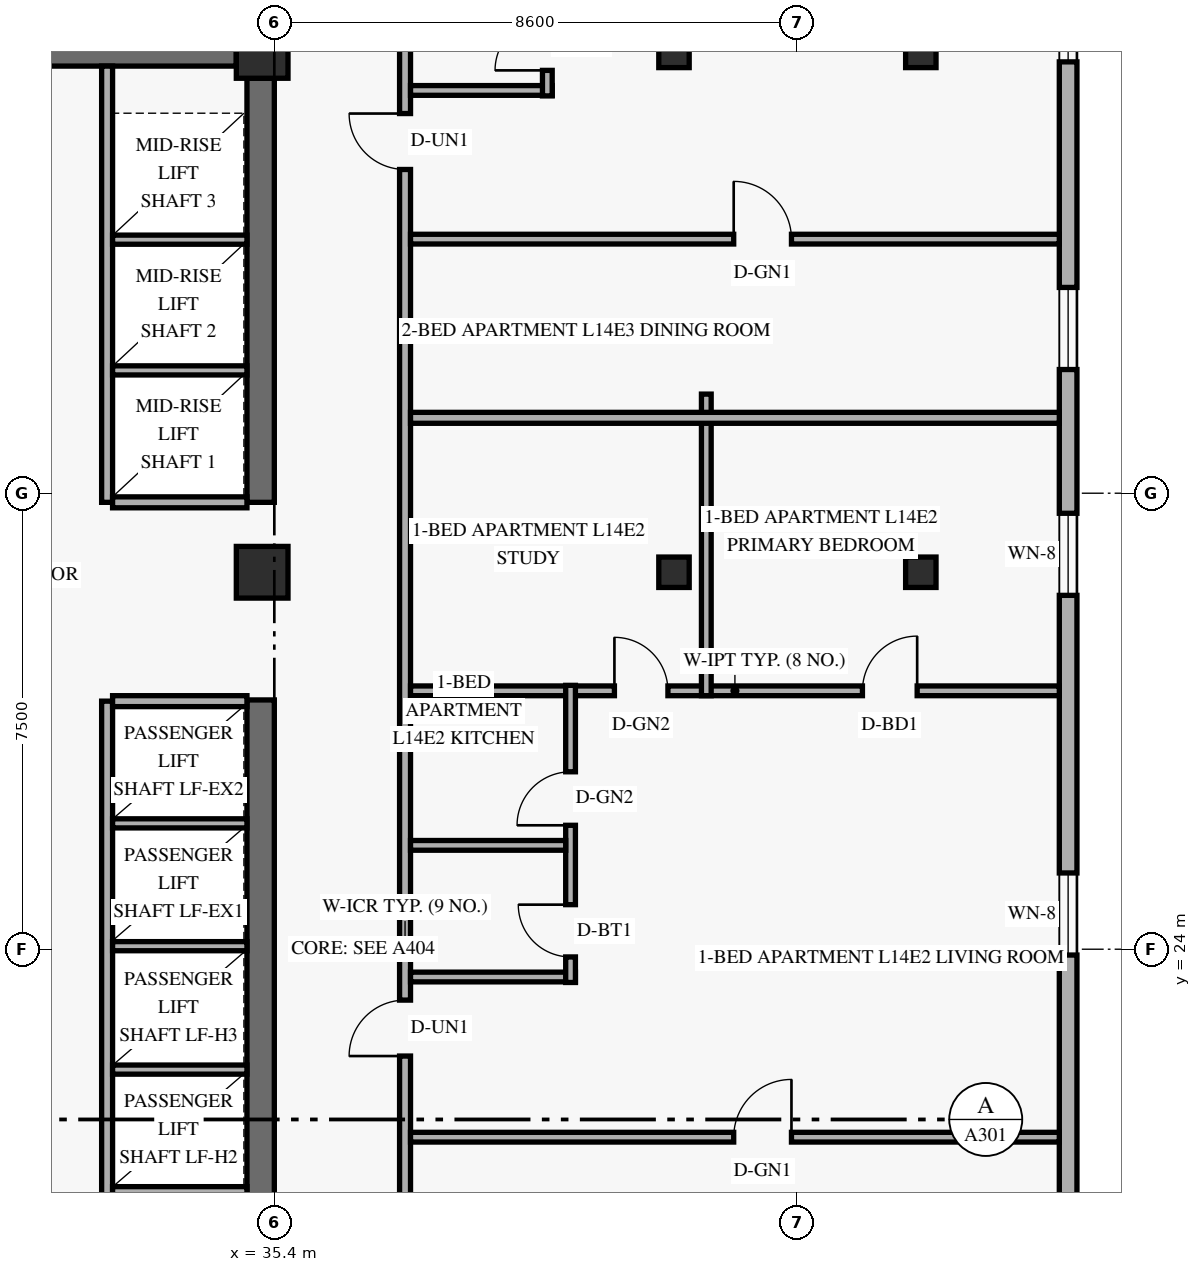
"""IFC4 building model, lengths in metres.
Left out: names, types, materials, properties, quantities, classifications, styles, units other than length and angle.
Written with IfcOpenShell. Run it as: python <this file> out.ifc"""

import sys

from ifc_helpers import new_model, si_unit, direction, frame, frame_2d, origin, origin_2d, place, context, subcontext, project, spatial, rectangle, hollow_rectangle, extrude, element, fill, save


model = new_model("IFC4")
c1 = context("Model", 3, precision=1e-05, world=origin(), true_north=direction((0.0, 1.0)))
c2 = subcontext(c1, "Body", "Model", "MODEL_VIEW")
j1 = project(units=[si_unit("LENGTHUNIT", "METRE"), si_unit("PLANEANGLEUNIT", "RADIAN")], contexts=[c1])
p1 = place(None, origin())
s1 = spatial("IfcSite", under=j1, at=p1, CompositionType="ELEMENT")
p2 = place(p1, origin())
s2 = spatial("IfcBuilding", under=s1, at=p2, CompositionType="ELEMENT")
p3 = place(p2, frame((0.0, 0.0, 56.4)))
s3 = spatial("IfcBuildingStorey", under=s2, at=p3, CompositionType="ELEMENT", Elevation=56.4)
p4 = place(p3, frame((35.175, 17.975, 0.0), z_axis=(0.0, 0.0, 1.0), x_axis=(0.0, 1.0, 0.0)))
e1 = element("IfcWall", 1, at=p4, inside=s3, PredefinedType="SHEAR", context=c2, shape_type="SweptSolid", body=[
    extrude(rectangle(XDim=10.125, YDim=0.45, at=frame_2d((5.062, 0.0))), origin(), (0.0, 0.0, 1.0), 2.657),
])
p5 = place(p3, frame((35.175, 31.35, 0.0), z_axis=(0.0, 0.0, 1.0), x_axis=(0.0, 1.0, 0.0)))
e2 = element("IfcWall", 2, at=p5, inside=s3, PredefinedType="SHEAR", context=c2, shape_type="SweptSolid", body=[
    extrude(rectangle(XDim=6.975, YDim=0.45, at=frame_2d((3.487, 0.0))), origin(), (0.0, 0.0, 1.0), 2.657),
])
p6 = place(p3, frame((24.625, 38.75, 0.0), z_axis=(0.0, 0.0, 1.0), x_axis=(1.0, 0.0, 0.0)))
e3 = element("IfcWall", 3, at=p6, inside=s3, PredefinedType="SHEAR", context=c2, shape_type="SweptSolid", body=[
    extrude(rectangle(XDim=10.15, YDim=0.45, at=frame_2d((5.075, 0.0))), origin(), (0.0, 0.0, 1.0), 3.35),
])
for number, where, z_axis, x_axis in (
    (4, (35.2, 30.2, 0.0), (0.0, 0.0, 1.0), (1.0, 0.0, 0.0)),
    (5, (35.2, 38.75, 0.0), (0.0, 0.0, 1.0), (1.0, 0.0, 0.0)),
):
    element("IfcColumn", number, at=place(p3, frame(where, z_axis=z_axis, x_axis=x_axis)), inside=s3, PredefinedType="COLUMN", context=c2, shape_type="SweptSolid", body=[
        extrude(rectangle(XDim=0.85, YDim=0.85, at=origin_2d()), origin(), (0.0, 0.0, 1.0), 3.6),
    ])
for number, where, z_axis, x_axis in (
    (6, (41.91, 30.2, 0.0), (0.035, 0.0, 0.999), (0.0, 1.0, 0.0)),
    (7, (41.91, 38.75, 0.0), (0.035, 0.0, 0.999), (0.0, 1.0, 0.0)),
):
    element("IfcColumn", number, at=place(p3, frame(where, z_axis=z_axis, x_axis=x_axis)), inside=s3, PredefinedType="COLUMN", context=c2, shape_type="SweptSolid", body=[
        extrude(hollow_rectangle(XDim=0.5, YDim=0.5, WallThickness=0.022, at=origin_2d()), origin(), (0.0, 0.0, 1.0), 3.602),
    ])
for number, where, z_axis, x_axis in (
    (8, (45.928, 30.2, 0.0), (0.058, 0.0, 0.998), (0.0, 1.0, 0.0)),
    (9, (45.928, 38.75, 0.0), (0.058, 0.0, 0.998), (0.0, 1.0, 0.0)),
):
    element("IfcColumn", number, at=place(p3, frame(where, z_axis=z_axis, x_axis=x_axis)), inside=s3, PredefinedType="COLUMN", context=c2, shape_type="SweptSolid", body=[
        extrude(hollow_rectangle(XDim=0.5, YDim=0.5, WallThickness=0.022, at=origin_2d()), origin(), (0.0, 0.0, 1.0), 3.606),
    ])
p7 = place(p3, frame((48.455, 4.62, 0.0), z_axis=(0.0, 0.0, 1.0), x_axis=(0.0, 1.0, 0.0)))
e10 = element("IfcWall", 10, at=p7, inside=s3, PredefinedType="SOLIDWALL", context=c2, shape_type="SweptSolid", body=[
    extrude(rectangle(XDim=38.76, YDim=0.29, at=frame_2d((19.38, 0.0))), origin(), (0.0, 0.0, 1.0), 3.35),
])
p8 = place(p7, frame((5.565, 0.0, 0.85)))
e11 = element("IfcOpeningElement", 11, at=p8, cuts=e10, PredefinedType="OPENING", context=c2, shape_type="SweptSolid", body=[
    extrude(rectangle(XDim=1.35, YDim=1.55, at=frame_2d((0.675, 0.775))), frame((0.0, 0.155, 0.0), z_axis=(0.0, -1.0, 0.0), x_axis=(1.0, 0.0, 0.0)), (0.0, 0.0, 1.0), 0.31),
])
p9 = place(p7, frame((13.709, 0.0, 0.85)))
e12 = element("IfcOpeningElement", 12, at=p9, cuts=e10, PredefinedType="OPENING", context=c2, shape_type="SweptSolid", body=[
    extrude(rectangle(XDim=1.35, YDim=1.55, at=frame_2d((0.675, 0.775))), frame((0.0, 0.155, 0.0), z_axis=(0.0, -1.0, 0.0), x_axis=(1.0, 0.0, 0.0)), (0.0, 0.0, 1.0), 0.31),
])
p10 = place(p7, frame((19.284, 0.0, 0.85)))
e13 = element("IfcOpeningElement", 13, at=p10, cuts=e10, PredefinedType="OPENING", context=c2, shape_type="SweptSolid", body=[
    extrude(rectangle(XDim=1.35, YDim=1.55, at=frame_2d((0.675, 0.775))), frame((0.0, 0.155, 0.0), z_axis=(0.0, -1.0, 0.0), x_axis=(1.0, 0.0, 0.0)), (0.0, 0.0, 1.0), 0.31),
])
p11 = place(p7, frame((25.2, 0.0, 0.85)))
e14 = element("IfcOpeningElement", 14, at=p11, cuts=e10, PredefinedType="OPENING", context=c2, shape_type="SweptSolid", body=[
    extrude(rectangle(XDim=1.35, YDim=1.55, at=frame_2d((0.675, 0.775))), frame((0.0, 0.155, 0.0), z_axis=(0.0, -1.0, 0.0), x_axis=(1.0, 0.0, 0.0)), (0.0, 0.0, 1.0), 0.31),
])
p12 = place(p7, frame((28.914, 0.0, 0.85)))
e15 = element("IfcOpeningElement", 15, at=p12, cuts=e10, PredefinedType="OPENING", context=c2, shape_type="SweptSolid", body=[
    extrude(rectangle(XDim=1.35, YDim=1.55, at=frame_2d((0.675, 0.775))), frame((0.0, 0.155, 0.0), z_axis=(0.0, -1.0, 0.0), x_axis=(1.0, 0.0, 0.0)), (0.0, 0.0, 1.0), 0.31),
])
p13 = place(p7, frame((33.975, 0.0, 0.85)))
e16 = element("IfcOpeningElement", 16, at=p13, cuts=e10, PredefinedType="OPENING", context=c2, shape_type="SweptSolid", body=[
    extrude(rectangle(XDim=1.35, YDim=1.55, at=frame_2d((0.675, 0.775))), frame((0.0, 0.155, 0.0), z_axis=(0.0, -1.0, 0.0), x_axis=(1.0, 0.0, 0.0)), (0.0, 0.0, 1.0), 0.31),
])
p14 = place(p3, frame((32.65, 18.02, 0.0), z_axis=(0.0, 0.0, 1.0), x_axis=(0.0, 1.0, 0.0)))
e17 = element("IfcWall", 17, at=p14, inside=s3, PredefinedType="STANDARD", context=c2, shape_type="SweptSolid", body=[
    extrude(rectangle(XDim=10.06, YDim=0.18, at=frame_2d((5.03, 0.0))), origin(), (0.0, 0.0, 1.0), 3.35),
])
p15 = place(p3, frame((32.74, 28.08, 0.0), z_axis=(0.0, 0.0, 1.0), x_axis=(1.0, 0.0, 0.0)))
e18 = element("IfcWall", 18, at=p15, inside=s3, PredefinedType="STANDARD", context=c2, shape_type="SweptSolid", body=[
    extrude(rectangle(XDim=2.21, YDim=0.18, at=frame_2d((1.105, 0.0))), origin(), (0.0, 0.0, 1.0), 3.35),
])
for number, where, z_axis, x_axis in (
    (19, (32.74, 20.02, 0.0), (0.0, 0.0, 1.0), (1.0, 0.0, 0.0)),
    (20, (32.74, 22.02, 0.0), (0.0, 0.0, 1.0), (1.0, 0.0, 0.0)),
    (21, (32.74, 24.05, 0.0), (0.0, 0.0, 1.0), (1.0, 0.0, 0.0)),
    (22, (32.74, 26.07, 0.0), (0.0, 0.0, 1.0), (1.0, 0.0, 0.0)),
):
    element("IfcWall", number, at=place(p3, frame(where, z_axis=z_axis, x_axis=x_axis)), inside=s3, PredefinedType="STANDARD", context=c2, shape_type="SweptSolid", body=[
        extrude(rectangle(XDim=2.21, YDim=0.15, at=frame_2d((1.105, 0.0))), origin(), (0.0, 0.0, 1.0), 3.35),
    ])
p16 = place(p3, frame((32.65, 31.35, 0.0), z_axis=(0.0, 0.0, 1.0), x_axis=(0.0, 1.0, 0.0)))
e23 = element("IfcWall", 23, at=p16, inside=s3, PredefinedType="STANDARD", context=c2, shape_type="SweptSolid", body=[
    extrude(rectangle(XDim=7.175, YDim=0.18, at=frame_2d((3.587, 0.0))), origin(), (0.0, 0.0, 1.0), 3.35),
])
p17 = place(p3, frame((32.74, 31.35, 0.0), z_axis=(0.0, 0.0, 1.0), x_axis=(1.0, 0.0, 0.0)))
e24 = element("IfcWall", 24, at=p17, inside=s3, PredefinedType="STANDARD", context=c2, shape_type="SweptSolid", body=[
    extrude(rectangle(XDim=2.21, YDim=0.18, at=frame_2d((1.105, 0.0))), origin(), (0.0, 0.0, 1.0), 3.35),
])
for number, where, z_axis, x_axis in (
    (25, (32.74, 33.52, 0.0), (0.0, 0.0, 1.0), (1.0, 0.0, 0.0)),
    (26, (32.74, 35.67, 0.0), (0.0, 0.0, 1.0), (1.0, 0.0, 0.0)),
):
    element("IfcWall", number, at=place(p3, frame(where, z_axis=z_axis, x_axis=x_axis)), inside=s3, PredefinedType="STANDARD", context=c2, shape_type="SweptSolid", body=[
        extrude(rectangle(XDim=2.21, YDim=0.15, at=frame_2d((1.105, 0.0))), origin(), (0.0, 0.0, 1.0), 3.35),
    ])
p18 = place(p3, frame((37.55, 1.29, 0.0), z_axis=(0.0, 0.0, 1.0), x_axis=(0.0, 1.0, 0.0)))
e27 = element("IfcWall", 27, at=p18, inside=s3, PredefinedType="STANDARD", context=c2, shape_type="SweptSolid", body=[
    extrude(rectangle(XDim=45.42, YDim=0.18, at=frame_2d((22.71, 0.0))), origin(), (0.0, 0.0, 1.0), 2.639),
])
p19 = place(p18, frame((9.87, 0.0, 0.0)))
e28 = element("IfcOpeningElement", 28, at=p19, cuts=e27, PredefinedType="OPENING", context=c2, shape_type="SweptSolid", body=[
    extrude(rectangle(XDim=0.92, YDim=2.15, at=frame_2d((0.46, 1.075))), frame((0.0, 0.1, 0.0), z_axis=(0.0, -1.0, 0.0), x_axis=(1.0, 0.0, 0.0)), (0.0, 0.0, 1.0), 0.2),
])
p20 = place(p18, frame((20.953, 0.0, 0.0)))
e29 = element("IfcOpeningElement", 29, at=p20, cuts=e27, PredefinedType="OPENING", context=c2, shape_type="SweptSolid", body=[
    extrude(rectangle(XDim=0.92, YDim=2.15, at=frame_2d((0.46, 1.075))), frame((0.0, 0.1, 0.0), z_axis=(0.0, -1.0, 0.0), x_axis=(1.0, 0.0, 0.0)), (0.0, 0.0, 1.0), 0.2),
])
p21 = place(p18, frame((35.534, 0.0, 0.0)))
e30 = element("IfcOpeningElement", 30, at=p21, cuts=e27, PredefinedType="OPENING", context=c2, shape_type="SweptSolid", body=[
    extrude(rectangle(XDim=0.92, YDim=2.15, at=frame_2d((0.46, 1.075))), frame((0.0, 0.1, 0.0), z_axis=(0.0, -1.0, 0.0), x_axis=(1.0, 0.0, 0.0)), (0.0, 0.0, 1.0), 0.2),
])
p22 = place(p3, frame((35.42, 38.75, 0.0), z_axis=(0.0, 0.0, 1.0), x_axis=(0.0, 1.0, 0.0)))
e31 = element("IfcWall", 31, at=p22, inside=s3, PredefinedType="STANDARD", context=c2, shape_type="SweptSolid", body=[
    extrude(rectangle(XDim=0.51, YDim=0.18, at=frame_2d((0.255, 0.0))), origin(), (0.0, 0.0, 1.0), 3.35),
])
p23 = place(p3, frame((37.64, 28.25, 0.0), z_axis=(0.0, 0.0, 1.0), x_axis=(1.0, 0.0, 0.0)))
e32 = element("IfcWall", 32, at=p23, inside=s3, PredefinedType="PARTITIONING", context=c2, shape_type="SweptSolid", body=[
    extrude(rectangle(XDim=10.67, YDim=0.16, at=frame_2d((5.335, 0.0))), origin(), (0.0, 0.0, 1.0), 2.639),
])
p24 = place(p23, frame((3.353, 0.0, 0.0)))
e33 = element("IfcOpeningElement", 33, at=p24, cuts=e32, PredefinedType="OPENING", context=c2, shape_type="SweptSolid", body=[
    extrude(rectangle(XDim=0.88, YDim=2.12, at=frame_2d((0.44, 1.06))), frame((0.0, 0.09, 0.0), z_axis=(0.0, -1.0, 0.0), x_axis=(1.0, 0.0, 0.0)), (0.0, 0.0, 1.0), 0.18),
])
p25 = place(p23, frame((7.432, 0.0, 0.0)))
e34 = element("IfcOpeningElement", 34, at=p25, cuts=e32, PredefinedType="OPENING", context=c2, shape_type="SweptSolid", body=[
    extrude(rectangle(XDim=0.9, YDim=2.14, at=frame_2d((0.45, 1.07))), frame((0.0, 0.09, 0.0), z_axis=(0.0, -1.0, 0.0), x_axis=(1.0, 0.0, 0.0)), (0.0, 0.0, 1.0), 0.18),
])
p26 = place(p3, frame((37.64, 23.543, 0.0), z_axis=(0.0, 0.0, 1.0), x_axis=(1.0, 0.0, 0.0)))
e35 = element("IfcWall", 35, at=p26, inside=s3, PredefinedType="PLUMBINGWALL", context=c2, shape_type="SweptSolid", body=[
    extrude(rectangle(XDim=2.712, YDim=0.16, at=frame_2d((1.356, 0.0))), origin(), (0.0, 0.0, 1.0), 3.35),
])
p27 = place(p3, frame((40.272, 23.453, 0.0), z_axis=(0.0, 0.0, 1.0), x_axis=(0.0, 1.0, 0.0)))
e36 = element("IfcWall", 36, at=p27, inside=s3, PredefinedType="PLUMBINGWALL", context=c2, shape_type="SweptSolid", body=[
    extrude(rectangle(XDim=4.887, YDim=0.16, at=frame_2d((2.444, 0.0))), origin(), (0.0, 0.0, 1.0), 2.922),
])
p28 = place(p27, frame((0.42, 0.0, 0.0)))
e37 = element("IfcOpeningElement", 37, at=p28, cuts=e36, PredefinedType="OPENING", context=c2, shape_type="SweptSolid", body=[
    extrude(rectangle(XDim=0.86, YDim=2.12, at=frame_2d((0.43, 1.06))), frame((0.0, 0.09, 0.0), z_axis=(0.0, -1.0, 0.0), x_axis=(1.0, 0.0, 0.0)), (0.0, 0.0, 1.0), 0.18),
])
p29 = place(p27, frame((2.585, 0.0, 0.0)))
e38 = element("IfcOpeningElement", 38, at=p29, cuts=e36, PredefinedType="OPENING", context=c2, shape_type="SweptSolid", body=[
    extrude(rectangle(XDim=0.88, YDim=2.12, at=frame_2d((0.44, 1.06))), frame((0.0, 0.09, 0.0), z_axis=(0.0, -1.0, 0.0), x_axis=(1.0, 0.0, 0.0)), (0.0, 0.0, 1.0), 0.18),
])
p30 = place(p3, frame((37.64, 25.708, 0.0), z_axis=(0.0, 0.0, 1.0), x_axis=(1.0, 0.0, 0.0)))
e39 = element("IfcWall", 39, at=p30, inside=s3, PredefinedType="PLUMBINGWALL", context=c2, shape_type="SweptSolid", body=[
    extrude(rectangle(XDim=2.552, YDim=0.16, at=frame_2d((1.276, 0.0))), origin(), (0.0, 0.0, 1.0), 3.35),
])
p31 = place(p3, frame((37.64, 20.908, 0.0), z_axis=(0.0, 0.0, 1.0), x_axis=(1.0, 0.0, 0.0)))
e40 = element("IfcWall", 40, at=p31, inside=s3, PredefinedType="PARTITIONING", context=c2, shape_type="SweptSolid", body=[
    extrude(rectangle(XDim=10.67, YDim=0.16, at=frame_2d((5.335, 0.0))), origin(), (0.0, 0.0, 1.0), 2.639),
])
p32 = place(p31, frame((5.315, 0.0, 0.0)))
e41 = element("IfcOpeningElement", 41, at=p32, cuts=e40, PredefinedType="OPENING", context=c2, shape_type="SweptSolid", body=[
    extrude(rectangle(XDim=0.95, YDim=2.15, at=frame_2d((0.475, 1.075))), frame((0.0, 0.09, 0.0), z_axis=(0.0, -1.0, 0.0), x_axis=(1.0, 0.0, 0.0)), (0.0, 0.0, 1.0), 0.18),
])
p33 = place(p3, frame((42.504, 28.17, 0.0), z_axis=(0.0, 0.0, 1.0), x_axis=(0.0, 1.0, 0.0)))
e42 = element("IfcWall", 42, at=p33, inside=s3, PredefinedType="PARTITIONING", context=c2, shape_type="SweptSolid", body=[
    extrude(rectangle(XDim=4.96, YDim=0.16, at=frame_2d((2.48, 0.0))), origin(), (0.0, 0.0, 1.0), 2.639),
])
p34 = place(p3, frame((37.64, 32.74, 0.0), z_axis=(0.0, 0.0, 1.0), x_axis=(1.0, 0.0, 0.0)))
e43 = element("IfcWall", 43, at=p34, inside=s3, PredefinedType="PARTITIONING", context=c2, shape_type="SweptSolid", body=[
    extrude(rectangle(XDim=10.67, YDim=0.18, at=frame_2d((5.335, 0.0))), origin(), (0.0, 0.0, 1.0), 2.639),
])
p35 = place(p3, frame((37.64, 38.125, 0.0), z_axis=(0.0, 0.0, 1.0), x_axis=(1.0, 0.0, 0.0)))
e44 = element("IfcWall", 44, at=p35, inside=s3, PredefinedType="PLUMBINGWALL", context=c2, shape_type="SweptSolid", body=[
    extrude(rectangle(XDim=2.33, YDim=0.16, at=frame_2d((1.165, 0.0))), origin(), (0.0, 0.0, 1.0), 3.35),
])
p36 = place(p3, frame((39.89, 38.034, 0.0), z_axis=(0.0, 0.0, 1.0), x_axis=(0.0, 1.0, 0.0)))
e45 = element("IfcWall", 45, at=p36, inside=s3, PredefinedType="PLUMBINGWALL", context=c2, shape_type="SweptSolid", body=[
    extrude(rectangle(XDim=4.916, YDim=0.16, at=frame_2d((2.458, 0.0))), origin(), (0.0, 0.0, 1.0), 2.639),
])
p37 = place(p36, frame((0.42, 0.0, 0.0)))
e46 = element("IfcOpeningElement", 46, at=p37, cuts=e45, PredefinedType="OPENING", context=c2, shape_type="SweptSolid", body=[
    extrude(rectangle(XDim=0.86, YDim=2.12, at=frame_2d((0.43, 1.06))), frame((0.0, 0.09, 0.0), z_axis=(0.0, -1.0, 0.0), x_axis=(1.0, 0.0, 0.0)), (0.0, 0.0, 1.0), 0.18),
])
p38 = place(p36, frame((2.598, 0.0, 0.0)))
e47 = element("IfcOpeningElement", 47, at=p38, cuts=e45, PredefinedType="OPENING", context=c2, shape_type="SweptSolid", body=[
    extrude(rectangle(XDim=0.88, YDim=2.12, at=frame_2d((0.44, 1.06))), frame((0.0, 0.09, 0.0), z_axis=(0.0, -1.0, 0.0), x_axis=(1.0, 0.0, 0.0)), (0.0, 0.0, 1.0), 0.18),
])
p39 = place(p3, frame((37.64, 35.679, 0.0), z_axis=(0.0, 0.0, 1.0), x_axis=(1.0, 0.0, 0.0)))
e48 = element("IfcWall", 48, at=p39, inside=s3, PredefinedType="PARTITIONING", context=c2, shape_type="SweptSolid", body=[
    extrude(rectangle(XDim=10.67, YDim=0.16, at=frame_2d((5.335, 0.0))), origin(), (0.0, 0.0, 1.0), 2.639),
])
p40 = place(p39, frame((5.315, 0.0, 0.0)))
e49 = element("IfcOpeningElement", 49, at=p40, cuts=e48, PredefinedType="OPENING", context=c2, shape_type="SweptSolid", body=[
    extrude(rectangle(XDim=0.95, YDim=2.15, at=frame_2d((0.475, 1.075))), frame((0.0, 0.09, 0.0), z_axis=(0.0, -1.0, 0.0), x_axis=(1.0, 0.0, 0.0)), (0.0, 0.0, 1.0), 0.18),
])
p41 = place(p10, origin())
e50 = element("IfcWindow", 50, at=p41, inside=s3, PartitioningType="SINGLE_PANEL", PredefinedType="WINDOW", context=c2, shape_type="SweptSolid", body=[
    extrude(rectangle(XDim=1.35, YDim=1.55, at=frame_2d((0.675, 0.775))), frame((0.0, 0.03, 0.0), z_axis=(0.0, -1.0, 0.0), x_axis=(1.0, 0.0, 0.0)), (0.0, 0.0, 1.0), 0.06),
])
fill(e13, e50)
p42 = place(p11, origin())
e51 = element("IfcWindow", 51, at=p42, inside=s3, PartitioningType="SINGLE_PANEL", PredefinedType="WINDOW", context=c2, shape_type="SweptSolid", body=[
    extrude(rectangle(XDim=1.35, YDim=1.55, at=frame_2d((0.675, 0.775))), frame((0.0, 0.03, 0.0), z_axis=(0.0, -1.0, 0.0), x_axis=(1.0, 0.0, 0.0)), (0.0, 0.0, 1.0), 0.06),
])
fill(e14, e51)
p43 = place(p12, origin())
e52 = element("IfcWindow", 52, at=p43, inside=s3, PartitioningType="SINGLE_PANEL", PredefinedType="WINDOW", context=c2, shape_type="SweptSolid", body=[
    extrude(rectangle(XDim=1.35, YDim=1.55, at=frame_2d((0.675, 0.775))), frame((0.0, 0.03, 0.0), z_axis=(0.0, -1.0, 0.0), x_axis=(1.0, 0.0, 0.0)), (0.0, 0.0, 1.0), 0.06),
])
fill(e15, e52)
p44 = place(p13, origin())
e53 = element("IfcWindow", 53, at=p44, inside=s3, PartitioningType="SINGLE_PANEL", PredefinedType="WINDOW", context=c2, shape_type="SweptSolid", body=[
    extrude(rectangle(XDim=1.35, YDim=1.55, at=frame_2d((0.675, 0.775))), frame((0.0, 0.03, 0.0), z_axis=(0.0, -1.0, 0.0), x_axis=(1.0, 0.0, 0.0)), (0.0, 0.0, 1.0), 0.06),
])
fill(e16, e53)
p45 = place(p32, origin())
e54 = element("IfcDoor", 54, at=p45, inside=s3, OperationType="SINGLE_SWING_RIGHT", PredefinedType="DOOR", context=c2, shape_type="SweptSolid", body=[
    extrude(rectangle(XDim=0.95, YDim=2.15, at=frame_2d((0.475, 1.075))), frame((0.0, 0.025, 0.0), z_axis=(0.0, -1.0, 0.0), x_axis=(1.0, 0.0, 0.0)), (0.0, 0.0, 1.0), 0.05),
])
fill(e41, e54)
p46 = place(p20, origin())
e55 = element("IfcDoor", 55, at=p46, inside=s3, OperationType="SINGLE_SWING_LEFT", PredefinedType="DOOR", context=c2, shape_type="SweptSolid", body=[
    extrude(rectangle(XDim=0.92, YDim=2.15, at=frame_2d((0.46, 1.075))), frame((0.0, 0.025, 0.0), z_axis=(0.0, -1.0, 0.0), x_axis=(1.0, 0.0, 0.0)), (0.0, 0.0, 1.0), 0.05),
])
fill(e29, e55)
p47 = place(p28, origin())
e56 = element("IfcDoor", 56, at=p47, inside=s3, OperationType="SINGLE_SWING_RIGHT", PredefinedType="DOOR", context=c2, shape_type="SweptSolid", body=[
    extrude(rectangle(XDim=0.86, YDim=2.12, at=frame_2d((0.43, 1.06))), frame((0.0, 0.025, 0.0), z_axis=(0.0, -1.0, 0.0), x_axis=(1.0, 0.0, 0.0)), (0.0, 0.0, 1.0), 0.05),
])
fill(e37, e56)
p48 = place(p29, origin())
e57 = element("IfcDoor", 57, at=p48, inside=s3, OperationType="SINGLE_SWING_LEFT", PredefinedType="DOOR", context=c2, shape_type="SweptSolid", body=[
    extrude(rectangle(XDim=0.88, YDim=2.12, at=frame_2d((0.44, 1.06))), frame((0.0, 0.025, 0.0), z_axis=(0.0, -1.0, 0.0), x_axis=(1.0, 0.0, 0.0)), (0.0, 0.0, 1.0), 0.05),
])
fill(e38, e57)
p49 = place(p24, origin())
e58 = element("IfcDoor", 58, at=p49, inside=s3, OperationType="SINGLE_SWING_LEFT", PredefinedType="DOOR", context=c2, shape_type="SweptSolid", body=[
    extrude(rectangle(XDim=0.88, YDim=2.12, at=frame_2d((0.44, 1.06))), frame((0.0, 0.025, 0.0), z_axis=(0.0, -1.0, 0.0), x_axis=(1.0, 0.0, 0.0)), (0.0, 0.0, 1.0), 0.05),
])
fill(e33, e58)
p50 = place(p25, origin())
e59 = element("IfcDoor", 59, at=p50, inside=s3, OperationType="SINGLE_SWING_RIGHT", PredefinedType="DOOR", context=c2, shape_type="SweptSolid", body=[
    extrude(rectangle(XDim=0.9, YDim=2.14, at=frame_2d((0.45, 1.07))), frame((0.0, 0.025, 0.0), z_axis=(0.0, -1.0, 0.0), x_axis=(1.0, 0.0, 0.0)), (0.0, 0.0, 1.0), 0.05),
])
fill(e34, e59)
p51 = place(p40, origin())
e60 = element("IfcDoor", 60, at=p51, inside=s3, OperationType="SINGLE_SWING_LEFT", PredefinedType="DOOR", context=c2, shape_type="SweptSolid", body=[
    extrude(rectangle(XDim=0.95, YDim=2.15, at=frame_2d((0.475, 1.075))), frame((0.0, 0.025, 0.0), z_axis=(0.0, -1.0, 0.0), x_axis=(1.0, 0.0, 0.0)), (0.0, 0.0, 1.0), 0.05),
])
fill(e49, e60)
p52 = place(p21, origin())
e61 = element("IfcDoor", 61, at=p52, inside=s3, OperationType="SINGLE_SWING_RIGHT", PredefinedType="DOOR", context=c2, shape_type="SweptSolid", body=[
    extrude(rectangle(XDim=0.92, YDim=2.15, at=frame_2d((0.46, 1.075))), frame((0.0, 0.025, 0.0), z_axis=(0.0, -1.0, 0.0), x_axis=(1.0, 0.0, 0.0)), (0.0, 0.0, 1.0), 0.05),
])
fill(e30, e61)
p53 = place(p37, origin())
e62 = element("IfcDoor", 62, at=p53, inside=s3, OperationType="SINGLE_SWING_LEFT", PredefinedType="DOOR", context=c2, shape_type="SweptSolid", body=[
    extrude(rectangle(XDim=0.86, YDim=2.12, at=frame_2d((0.43, 1.06))), frame((0.0, 0.025, 0.0), z_axis=(0.0, -1.0, 0.0), x_axis=(1.0, 0.0, 0.0)), (0.0, 0.0, 1.0), 0.05),
])
fill(e46, e62)
save(model, sys.argv[1])
